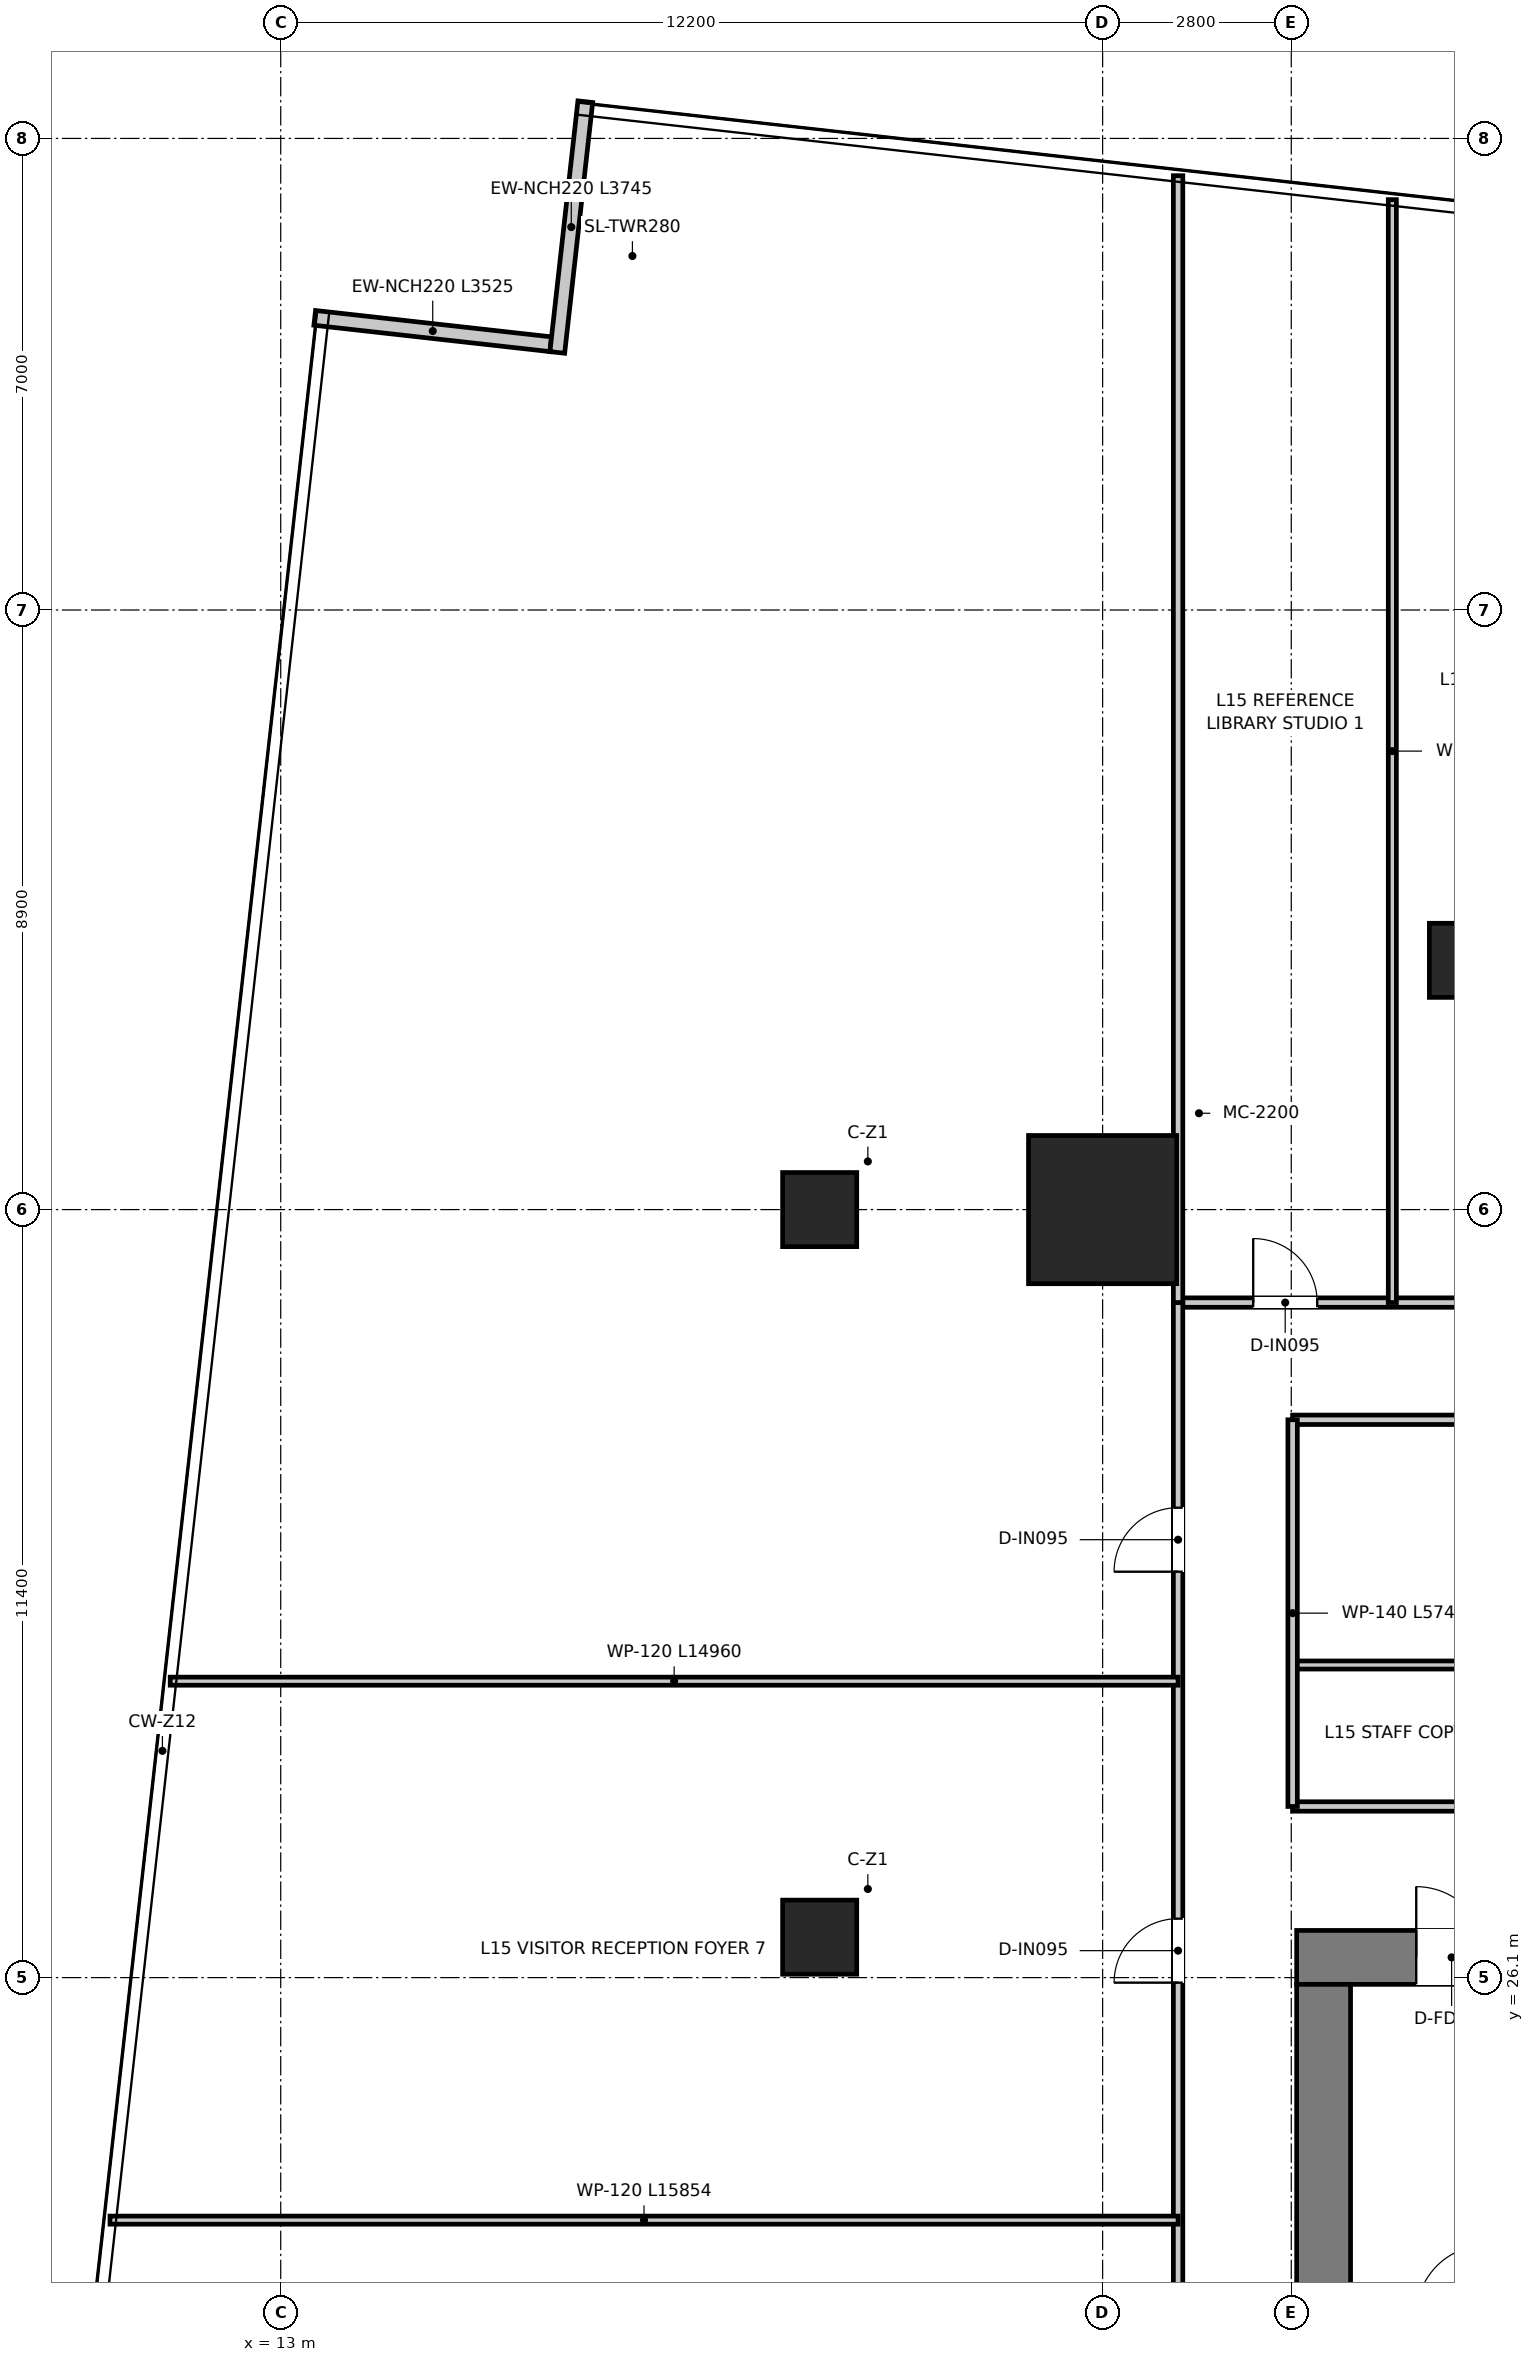
"""IFC4 building model, lengths in metres.
Left out: names, types, materials, properties, quantities, classifications, styles, units other than length and angle.
Written with IfcOpenShell. Run it as: python <this file> out.ifc"""

import sys

from ifc_helpers import new_model, si_unit, direction, frame, frame_2d, origin, origin_2d, place, context, subcontext, project, spatial, rectangle, extrude, source, transform, mapped, element, fill, save


model = new_model("IFC4")
c1 = context("Model", 3, precision=1e-05, world=origin(), true_north=direction((0.0, 1.0)))
c2 = subcontext(c1, "Body", "Model", "MODEL_VIEW")
j1 = project(units=[si_unit("LENGTHUNIT", "METRE"), si_unit("PLANEANGLEUNIT", "RADIAN")], contexts=[c1])
p1 = place(None, origin())
s1 = spatial("IfcSite", under=j1, at=p1, CompositionType="ELEMENT")
p2 = place(p1, origin())
s2 = spatial("IfcBuilding", under=s1, at=p2, CompositionType="ELEMENT")
p3 = place(p2, frame((0.0, 0.0, 64.5)))
s3 = spatial("IfcBuildingStorey", under=s2, at=p3, CompositionType="ELEMENT", Elevation=64.5)
p4 = place(p3, frame((28.08, 26.4, 0.0), z_axis=(0.0, 0.0, 1.0), x_axis=(1.0, 0.0, 0.0)))
e1 = element("IfcWall", 1, at=p4, inside=s3, PredefinedType="SHEAR", context=c2, shape_type="SweptSolid", body=[
    extrude(rectangle(XDim=15.84, YDim=0.8, at=frame_2d((7.92, 0.0))), origin(), (0.0, 0.0, 1.0), 3.95),
])
p5 = place(p4, frame((7.22, 0.0, 0.0)))
e2 = element("IfcOpeningElement", 2, at=p5, cuts=e1, PredefinedType="OPENING", context=c2, shape_type="SweptSolid", body=[
    extrude(rectangle(XDim=1.4, YDim=2.2, at=frame_2d((0.7, 1.1))), frame((0.0, 0.41, 0.0), z_axis=(0.0, -1.0, 0.0), x_axis=(1.0, 0.0, 0.0)), (0.0, 0.0, 1.0), 0.82),
])
p6 = place(p4, frame((1.775, 0.0, 0.0)))
e3 = element("IfcOpeningElement", 3, at=p6, cuts=e1, PredefinedType="OPENING", context=c2, shape_type="SweptSolid", body=[
    extrude(rectangle(XDim=1.05, YDim=2.1, at=frame_2d((0.525, 1.05))), frame((0.0, 0.41, 0.0), z_axis=(0.0, -1.0, 0.0), x_axis=(1.0, 0.0, 0.0)), (0.0, 0.0, 1.0), 0.82),
])
p7 = place(p4, frame((13.015, 0.0, 0.0)))
e4 = element("IfcOpeningElement", 4, at=p7, cuts=e1, PredefinedType="OPENING", context=c2, shape_type="SweptSolid", body=[
    extrude(rectangle(XDim=1.05, YDim=2.1, at=frame_2d((0.525, 1.05))), frame((0.0, 0.41, 0.0), z_axis=(0.0, -1.0, 0.0), x_axis=(1.0, 0.0, 0.0)), (0.0, 0.0, 1.0), 0.82),
])
p8 = place(p3, frame((28.48, 11.3, 0.0), z_axis=(0.0, 0.0, 1.0), x_axis=(0.0, 1.0, 0.0)))
e5 = element("IfcWall", 5, at=p8, inside=s3, PredefinedType="SHEAR", context=c2, shape_type="SweptSolid", body=[
    extrude(rectangle(XDim=14.7, YDim=0.8, at=frame_2d((7.35, 0.0))), origin(), (0.0, 0.0, 1.0), 3.95),
])
m1 = source(origin(), c2, "Body", "SweptSolid", [
    extrude(rectangle(XDim=2.2, YDim=2.2, at=origin_2d()), origin(), (0.0, 0.0, 1.0), 3.95),
])
p9 = place(p3, frame((25.2, 37.5, 0.0), z_axis=(0.0, 0.0, 1.0), x_axis=(1.0, 0.0, 0.0)))
e6 = element("IfcColumn", 6, at=p9, inside=s3, PredefinedType="USERDEFINED", context=c2, shape_type="MappedRepresentation", body=[
    mapped(m1, transform((0.0, 0.0, 0.0), x_axis=(1.0, 0.0, 0.0), y_axis=(0.0, 1.0, 0.0), z_axis=(0.0, 0.0, 1.0), scale=1.0)),
])
m2 = source(origin(), c2, "Body", "SweptSolid", [
    extrude(rectangle(XDim=1.1, YDim=1.1, at=origin_2d()), origin(), (0.0, 0.0, 1.0), 3.95),
])
for number, where, z_axis, x_axis in (
    (7, (21.0, 26.7, 0.0), (0.0, 0.0, 1.0), (1.0, 0.0, 0.0)),
    (8, (21.0, 37.5, 0.0), (0.0, 0.0, 1.0), (1.0, 0.0, 0.0)),
    (9, (30.6, 41.2, 0.0), (0.0, 0.0, 1.0), (1.0, 0.0, 0.0)),
):
    element("IfcColumn", number, at=place(p3, frame(where, z_axis=z_axis, x_axis=x_axis)), inside=s3, PredefinedType="COLUMN", context=c2, shape_type="MappedRepresentation", body=[
        mapped(m2, transform((0.0, 0.0, 0.0), x_axis=(1.0, 0.0, 0.0), y_axis=(0.0, 1.0, 0.0), z_axis=(0.0, 0.0, 1.0), scale=1.0)),
    ])
p10 = place(p3, frame((17.008, 50.345, 0.0), z_axis=(0.0, 0.0, 1.0), x_axis=(-0.993817675948, 0.111024443135, 0.0)))
e10 = element("IfcWall", 10, at=p10, inside=s3, PredefinedType="ELEMENTEDWALL", context=c2, shape_type="SweptSolid", body=[
    extrude(rectangle(XDim=3.525, YDim=0.22, at=frame_2d((1.762, 0.0))), origin(), (0.0, 0.0, 1.0), 3.67),
])
p11 = place(p3, frame((17.521, 53.945, 0.0), z_axis=(0.0, 0.0, 1.0), x_axis=(-0.111082600583, -0.99381117716, 0.0)))
e11 = element("IfcWall", 11, at=p11, inside=s3, PredefinedType="ELEMENTEDWALL", context=c2, shape_type="SweptSolid", body=[
    extrude(rectangle(XDim=3.745, YDim=0.22, at=frame_2d((1.873, 0.0))), origin(), (0.0, 0.0, 1.0), 3.67),
])
p12 = place(p3, frame((28.02, 28.64, 0.0), z_axis=(0.0, 0.0, 1.0), x_axis=(1.0, 0.0, 0.0)))
e12 = element("IfcWall", 12, at=p12, inside=s3, PredefinedType="PARTITIONING", context=c2, shape_type="SweptSolid", body=[
    extrude(rectangle(XDim=15.96, YDim=0.14, at=frame_2d((7.98, 0.0))), origin(), (0.0, 0.0, 1.0), 3.08),
])
p13 = place(p12, frame((7.455, 0.0, 0.0)))
e13 = element("IfcOpeningElement", 13, at=p13, cuts=e12, PredefinedType="OPENING", context=c2, shape_type="SweptSolid", body=[
    extrude(rectangle(XDim=1.05, YDim=2.15, at=frame_2d((0.525, 1.075))), frame((0.0, 0.08, 0.0), z_axis=(0.0, -1.0, 0.0), x_axis=(1.0, 0.0, 0.0)), (0.0, 0.0, 1.0), 0.16),
])
p14 = place(p3, frame((28.02, 30.74, 0.0), z_axis=(0.0, 0.0, 1.0), x_axis=(1.0, 0.0, 0.0)))
e14 = element("IfcWall", 14, at=p14, inside=s3, PredefinedType="PARTITIONING", context=c2, shape_type="SweptSolid", body=[
    extrude(rectangle(XDim=15.96, YDim=0.12, at=frame_2d((7.98, 0.0))), origin(), (0.0, 0.0, 1.0), 3.08),
])
p15 = place(p3, frame((28.02, 34.38, 0.0), z_axis=(0.0, 0.0, 1.0), x_axis=(1.0, 0.0, 0.0)))
e15 = element("IfcWall", 15, at=p15, inside=s3, PredefinedType="PARTITIONING", context=c2, shape_type="SweptSolid", body=[
    extrude(rectangle(XDim=15.96, YDim=0.14, at=frame_2d((7.98, 0.0))), origin(), (0.0, 0.0, 1.0), 3.08),
])
p16 = place(p15, frame((7.83, 0.0, 0.0)))
e16 = element("IfcOpeningElement", 16, at=p16, cuts=e15, PredefinedType="OPENING", context=c2, shape_type="SweptSolid", body=[
    extrude(rectangle(XDim=0.9, YDim=2.1, at=frame_2d((0.45, 1.05))), frame((0.0, 0.08, 0.0), z_axis=(0.0, -1.0, 0.0), x_axis=(1.0, 0.0, 0.0)), (0.0, 0.0, 1.0), 0.16),
])
p17 = place(p15, frame((11.03, 0.0, 0.0)))
e17 = element("IfcOpeningElement", 17, at=p17, cuts=e15, PredefinedType="OPENING", context=c2, shape_type="SweptSolid", body=[
    extrude(rectangle(XDim=0.9, YDim=2.1, at=frame_2d((0.45, 1.05))), frame((0.0, 0.08, 0.0), z_axis=(0.0, -1.0, 0.0), x_axis=(1.0, 0.0, 0.0)), (0.0, 0.0, 1.0), 0.16),
])
p18 = place(p15, frame((14.055, 0.0, 0.0)))
e18 = element("IfcOpeningElement", 18, at=p18, cuts=e15, PredefinedType="OPENING", context=c2, shape_type="SweptSolid", body=[
    extrude(rectangle(XDim=0.95, YDim=2.1, at=frame_2d((0.475, 1.05))), frame((0.0, 0.08, 0.0), z_axis=(0.0, -1.0, 0.0), x_axis=(1.0, 0.0, 0.0)), (0.0, 0.0, 1.0), 0.16),
])
p19 = place(p15, frame((2.855, 0.0, 0.0)))
e19 = element("IfcOpeningElement", 19, at=p19, cuts=e15, PredefinedType="OPENING", context=c2, shape_type="SweptSolid", body=[
    extrude(rectangle(XDim=0.95, YDim=2.1, at=frame_2d((0.475, 1.05))), frame((0.0, 0.08, 0.0), z_axis=(0.0, -1.0, 0.0), x_axis=(1.0, 0.0, 0.0)), (0.0, 0.0, 1.0), 0.16),
])
p20 = place(p3, frame((28.02, 28.64, 0.0), z_axis=(0.0, 0.0, 1.0), x_axis=(0.0, 1.0, 0.0)))
e20 = element("IfcWall", 20, at=p20, inside=s3, PredefinedType="PARTITIONING", context=c2, shape_type="SweptSolid", body=[
    extrude(rectangle(XDim=5.74, YDim=0.14, at=frame_2d((2.87, 0.0))), origin(), (0.0, 0.0, 1.0), 3.22),
])
p21 = place(p3, frame((26.32, 36.12, 0.0), z_axis=(0.0, 0.0, 1.0), x_axis=(1.0, 0.0, 0.0)))
e21 = element("IfcWall", 21, at=p21, inside=s3, PredefinedType="PARTITIONING", context=c2, shape_type="SweptSolid", body=[
    extrude(rectangle(XDim=19.36, YDim=0.14, at=frame_2d((9.68, 0.0))), origin(), (0.0, 0.0, 1.0), 3.08),
])
p22 = place(p21, frame((1.115, 0.0, 0.0)))
e22 = element("IfcOpeningElement", 22, at=p22, cuts=e21, PredefinedType="OPENING", context=c2, shape_type="SweptSolid", body=[
    extrude(rectangle(XDim=0.95, YDim=2.1, at=frame_2d((0.475, 1.05))), frame((0.0, 0.08, 0.0), z_axis=(0.0, -1.0, 0.0), x_axis=(1.0, 0.0, 0.0)), (0.0, 0.0, 1.0), 0.16),
])
p23 = place(p21, frame((4.955, 0.0, 0.0)))
e23 = element("IfcOpeningElement", 23, at=p23, cuts=e21, PredefinedType="OPENING", context=c2, shape_type="SweptSolid", body=[
    extrude(rectangle(XDim=0.95, YDim=2.1, at=frame_2d((0.475, 1.05))), frame((0.0, 0.08, 0.0), z_axis=(0.0, -1.0, 0.0), x_axis=(1.0, 0.0, 0.0)), (0.0, 0.0, 1.0), 0.16),
])
p24 = place(p21, frame((9.455, 0.0, 0.0)))
e24 = element("IfcOpeningElement", 24, at=p24, cuts=e21, PredefinedType="OPENING", context=c2, shape_type="SweptSolid", body=[
    extrude(rectangle(XDim=0.95, YDim=2.1, at=frame_2d((0.475, 1.05))), frame((0.0, 0.08, 0.0), z_axis=(0.0, -1.0, 0.0), x_axis=(1.0, 0.0, 0.0)), (0.0, 0.0, 1.0), 0.16),
])
p25 = place(p21, frame((13.955, 0.0, 0.0)))
e25 = element("IfcOpeningElement", 25, at=p25, cuts=e21, PredefinedType="OPENING", context=c2, shape_type="SweptSolid", body=[
    extrude(rectangle(XDim=0.95, YDim=2.1, at=frame_2d((0.475, 1.05))), frame((0.0, 0.08, 0.0), z_axis=(0.0, -1.0, 0.0), x_axis=(1.0, 0.0, 0.0)), (0.0, 0.0, 1.0), 0.16),
])
p26 = place(p21, frame((17.545, 0.0, 0.0)))
e26 = element("IfcOpeningElement", 26, at=p26, cuts=e21, PredefinedType="OPENING", context=c2, shape_type="SweptSolid", body=[
    extrude(rectangle(XDim=0.95, YDim=2.1, at=frame_2d((0.475, 1.05))), frame((0.0, 0.08, 0.0), z_axis=(0.0, -1.0, 0.0), x_axis=(1.0, 0.0, 0.0)), (0.0, 0.0, 1.0), 0.16),
])
p27 = place(p3, frame((26.32, 10.5, 0.0), z_axis=(0.0, 0.0, 1.0), x_axis=(0.0, 1.0, 0.0)))
e27 = element("IfcWall", 27, at=p27, inside=s3, PredefinedType="PARTITIONING", context=c2, shape_type="SweptSolid", body=[
    extrude(rectangle(XDim=25.62, YDim=0.14, at=frame_2d((12.81, 0.0))), origin(), (0.0, 0.0, 1.0), 2.97),
])
p28 = place(p27, frame((9.025, 0.0, 0.0)))
e28 = element("IfcOpeningElement", 28, at=p28, cuts=e27, PredefinedType="OPENING", context=c2, shape_type="SweptSolid", body=[
    extrude(rectangle(XDim=0.95, YDim=2.1, at=frame_2d((0.475, 1.05))), frame((0.0, 0.08, 0.0), z_axis=(0.0, -1.0, 0.0), x_axis=(1.0, 0.0, 0.0)), (0.0, 0.0, 1.0), 0.16),
])
p29 = place(p27, frame((15.525, 0.0, 0.0)))
e29 = element("IfcOpeningElement", 29, at=p29, cuts=e27, PredefinedType="OPENING", context=c2, shape_type="SweptSolid", body=[
    extrude(rectangle(XDim=0.95, YDim=2.1, at=frame_2d((0.475, 1.05))), frame((0.0, 0.08, 0.0), z_axis=(0.0, -1.0, 0.0), x_axis=(1.0, 0.0, 0.0)), (0.0, 0.0, 1.0), 0.16),
])
p30 = place(p27, frame((21.625, 0.0, 0.0)))
e30 = element("IfcOpeningElement", 30, at=p30, cuts=e27, PredefinedType="OPENING", context=c2, shape_type="SweptSolid", body=[
    extrude(rectangle(XDim=0.95, YDim=2.1, at=frame_2d((0.475, 1.05))), frame((0.0, 0.08, 0.0), z_axis=(0.0, -1.0, 0.0), x_axis=(1.0, 0.0, 0.0)), (0.0, 0.0, 1.0), 0.16),
])
p31 = place(p3, frame((26.32, 36.12, 0.0), z_axis=(0.0, 0.0, 1.0), x_axis=(0.0, 1.0, 0.0)))
e31 = element("IfcWall", 31, at=p31, inside=s3, PredefinedType="PARTITIONING", context=c2, shape_type="SweptSolid", body=[
    extrude(rectangle(XDim=16.726, YDim=0.14, at=frame_2d((8.363, 0.0))), origin(), (0.0, 0.0, 1.0), 2.97),
])
p32 = place(p3, frame((29.5, 36.12, 0.0), z_axis=(0.0, 0.0, 1.0), x_axis=(0.0, 1.0, 0.0)))
e32 = element("IfcWall", 32, at=p32, inside=s3, PredefinedType="PARTITIONING", context=c2, shape_type="SweptSolid", body=[
    extrude(rectangle(XDim=16.371, YDim=0.12, at=frame_2d((8.186, 0.0))), origin(), (0.0, 0.0, 1.0), 2.97),
])
p33 = place(p3, frame((10.466, 22.5, 0.0), z_axis=(0.0, 0.0, 1.0), x_axis=(1.0, 0.0, 0.0)))
e33 = element("IfcWall", 33, at=p33, inside=s3, PredefinedType="PARTITIONING", context=c2, shape_type="SweptSolid", body=[
    extrude(rectangle(XDim=15.854, YDim=0.12, at=frame_2d((7.927, 0.0))), origin(), (0.0, 0.0, 1.0), 2.97),
])
p34 = place(p3, frame((11.36, 30.5, 0.0), z_axis=(0.0, 0.0, 1.0), x_axis=(1.0, 0.0, 0.0)))
e34 = element("IfcWall", 34, at=p34, inside=s3, PredefinedType="PARTITIONING", context=c2, shape_type="SweptSolid", body=[
    extrude(rectangle(XDim=14.96, YDim=0.12, at=frame_2d((7.48, 0.0))), origin(), (0.0, 0.0, 1.0), 2.97),
])
p35 = place(p6, origin())
e35 = element("IfcDoor", 35, at=p35, inside=s3, OperationType="SINGLE_SWING_LEFT", PredefinedType="DOOR", context=c2, shape_type="SweptSolid", body=[
    extrude(rectangle(XDim=1.05, YDim=2.1, at=frame_2d((0.525, 1.05))), frame((0.0, 0.025, 0.0), z_axis=(0.0, -1.0, 0.0), x_axis=(1.0, 0.0, 0.0)), (0.0, 0.0, 1.0), 0.05),
])
fill(e3, e35)
p36 = place(p22, origin())
e36 = element("IfcDoor", 36, at=p36, inside=s3, OperationType="SINGLE_SWING_LEFT", PredefinedType="DOOR", context=c2, shape_type="SweptSolid", body=[
    extrude(rectangle(XDim=0.95, YDim=2.1, at=frame_2d((0.475, 1.05))), frame((0.0, 0.025, 0.0), z_axis=(0.0, -1.0, 0.0), x_axis=(1.0, 0.0, 0.0)), (0.0, 0.0, 1.0), 0.05),
])
fill(e22, e36)
p37 = place(p29, origin())
e37 = element("IfcDoor", 37, at=p37, inside=s3, OperationType="SINGLE_SWING_LEFT", PredefinedType="DOOR", context=c2, shape_type="SweptSolid", body=[
    extrude(rectangle(XDim=0.95, YDim=2.1, at=frame_2d((0.475, 1.05))), frame((0.0, 0.025, 0.0), z_axis=(0.0, -1.0, 0.0), x_axis=(1.0, 0.0, 0.0)), (0.0, 0.0, 1.0), 0.05),
])
fill(e29, e37)
p38 = place(p30, origin())
e38 = element("IfcDoor", 38, at=p38, inside=s3, OperationType="SINGLE_SWING_LEFT", PredefinedType="DOOR", context=c2, shape_type="SweptSolid", body=[
    extrude(rectangle(XDim=0.95, YDim=2.1, at=frame_2d((0.475, 1.05))), frame((0.0, 0.025, 0.0), z_axis=(0.0, -1.0, 0.0), x_axis=(1.0, 0.0, 0.0)), (0.0, 0.0, 1.0), 0.05),
])
fill(e30, e38)
save(model, sys.argv[1])
